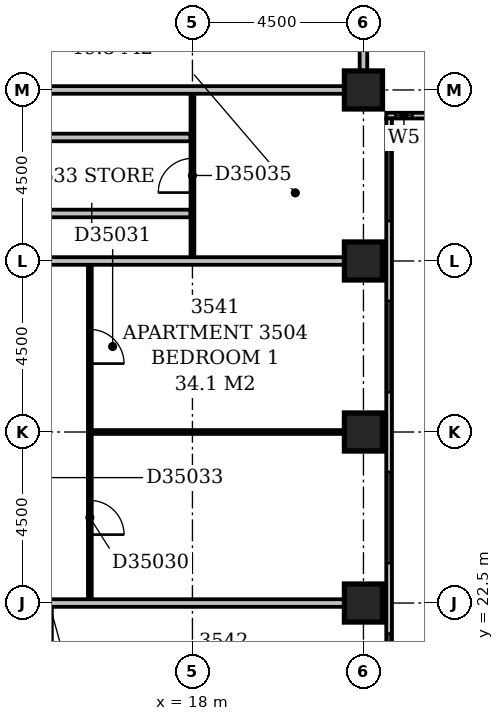
"""IFC4 building model, lengths in metres.
Left out: names, types, materials, properties, quantities, classifications, styles, units other than length and angle.
Written with IfcOpenShell. Run it as: python <this file> out.ifc"""

import sys

from ifc_helpers import new_model, si_unit, direction, frame, frame_2d, origin, origin_2d, place, context, subcontext, project, spatial, rectangle, extrude, element, fill, save


model = new_model("IFC4")
c1 = context("Model", 3, precision=1e-05, world=origin(), true_north=direction((0.0, 1.0)))
c2 = subcontext(c1, "Body", "Model", "MODEL_VIEW")
j1 = project(units=[si_unit("LENGTHUNIT", "METRE"), si_unit("PLANEANGLEUNIT", "RADIAN")], contexts=[c1])
p1 = place(None, origin())
s1 = spatial("IfcSite", under=j1, at=p1, CompositionType="ELEMENT")
p2 = place(p1, origin())
s2 = spatial("IfcBuilding", under=s1, at=p2, CompositionType="ELEMENT")
p3 = place(p2, frame((0.0, 0.0, 141.2)))
s3 = spatial("IfcBuildingStorey", under=s2, at=p3, CompositionType="ELEMENT", Elevation=141.2)
for number, where, z_axis, x_axis in (
    (1, (22.5, 22.5, -0.3), (0.0, 0.0, 1.0), (1.0, 0.0, 0.0)),
    (2, (22.5, 27.0, -0.3), (0.0, 0.0, 1.0), (1.0, 0.0, 0.0)),
    (3, (22.5, 31.5, -0.3), (0.0, 0.0, 1.0), (1.0, 0.0, 0.0)),
    (4, (22.5, 36.0, -0.3), (0.0, 0.0, 1.0), (1.0, 0.0, 0.0)),
):
    element("IfcColumn", number, at=place(p3, frame(where, z_axis=z_axis, x_axis=x_axis)), inside=s3, PredefinedType="COLUMN", context=c2, shape_type="SweptSolid", body=[
        extrude(rectangle(XDim=1.0, YDim=1.0, at=origin_2d()), origin(), (0.0, 0.0, 1.0), 3.6),
    ])
p4 = place(p3, frame((23.175, 17.4, 0.0), z_axis=(0.0, 0.0, 1.0), x_axis=(0.0, 1.0, 0.0)))
e5 = element("IfcWall", 5, at=p4, inside=s3, PredefinedType="STANDARD", context=c2, shape_type="SweptSolid", body=[
    extrude(rectangle(XDim=17.85, YDim=0.15, at=frame_2d((8.925, 0.0))), origin(), (0.0, 0.0, 1.0), 2.7),
])
p5 = place(p4, frame((3.397, 0.0, 0.6)))
e6 = element("IfcOpeningElement", 6, at=p5, cuts=e5, PredefinedType="OPENING", context=c2, shape_type="SweptSolid", body=[
    extrude(rectangle(XDim=0.9, YDim=1.8, at=frame_2d((0.45, 0.9))), frame((0.0, 0.087, 0.0), z_axis=(0.0, -1.0, 0.0), x_axis=(1.0, 0.0, 0.0)), (0.0, 0.0, 1.0), 0.174),
])
p6 = place(p4, frame((6.15, 0.0, 0.6)))
e7 = element("IfcOpeningElement", 7, at=p6, cuts=e5, PredefinedType="OPENING", context=c2, shape_type="SweptSolid", body=[
    extrude(rectangle(XDim=2.4, YDim=1.8, at=frame_2d((1.2, 0.9))), frame((0.0, 0.087, 0.0), z_axis=(0.0, -1.0, 0.0), x_axis=(1.0, 0.0, 0.0)), (0.0, 0.0, 1.0), 0.174),
])
p7 = place(p4, frame((10.65, 0.0, 0.6)))
e8 = element("IfcOpeningElement", 8, at=p7, cuts=e5, PredefinedType="OPENING", context=c2, shape_type="SweptSolid", body=[
    extrude(rectangle(XDim=2.4, YDim=1.8, at=frame_2d((1.2, 0.9))), frame((0.0, 0.087, 0.0), z_axis=(0.0, -1.0, 0.0), x_axis=(1.0, 0.0, 0.0)), (0.0, 0.0, 1.0), 0.174),
])
p8 = place(p4, frame((15.15, 0.0, 0.6)))
e9 = element("IfcOpeningElement", 9, at=p8, cuts=e5, PredefinedType="OPENING", context=c2, shape_type="SweptSolid", body=[
    extrude(rectangle(XDim=2.4, YDim=1.8, at=frame_2d((1.2, 0.9))), frame((0.0, 0.087, 0.0), z_axis=(0.0, -1.0, 0.0), x_axis=(1.0, 0.0, 0.0)), (0.0, 0.0, 1.0), 0.174),
])
p9 = place(p3, frame((23.1, 35.325, 0.0), z_axis=(0.0, 0.0, 1.0), x_axis=(1.0, 0.0, 0.0)))
e10 = element("IfcWall", 10, at=p9, inside=s3, PredefinedType="STANDARD", context=c2, shape_type="SweptSolid", body=[
    extrude(rectangle(XDim=45.15, YDim=0.15, at=frame_2d((22.575, 0.0))), origin(), (0.0, 0.0, 1.0), 2.7),
])
p10 = place(p9, frame((0.24, 0.0, 0.6)))
e11 = element("IfcOpeningElement", 11, at=p10, cuts=e10, PredefinedType="OPENING", context=c2, shape_type="SweptSolid", body=[
    extrude(rectangle(XDim=0.45, YDim=1.8, at=frame_2d((0.225, 0.9))), frame((0.0, 0.087, 0.0), z_axis=(0.0, -1.0, 0.0), x_axis=(1.0, 0.0, 0.0)), (0.0, 0.0, 1.0), 0.174),
])
p11 = place(p9, frame((2.529, 0.0, 0.6)))
e12 = element("IfcOpeningElement", 12, at=p11, cuts=e10, PredefinedType="OPENING", context=c2, shape_type="SweptSolid", body=[
    extrude(rectangle(XDim=0.6, YDim=1.8, at=frame_2d((0.3, 0.9))), frame((0.0, 0.087, 0.0), z_axis=(0.0, -1.0, 0.0), x_axis=(1.0, 0.0, 0.0)), (0.0, 0.0, 1.0), 0.174),
])
p12 = place(p9, frame((4.95, 0.0, 0.6)))
e13 = element("IfcOpeningElement", 13, at=p12, cuts=e10, PredefinedType="OPENING", context=c2, shape_type="SweptSolid", body=[
    extrude(rectangle(XDim=2.4, YDim=1.8, at=frame_2d((1.2, 0.9))), frame((0.0, 0.087, 0.0), z_axis=(0.0, -1.0, 0.0), x_axis=(1.0, 0.0, 0.0)), (0.0, 0.0, 1.0), 0.174),
])
p13 = place(p9, frame((9.45, 0.0, 0.6)))
e14 = element("IfcOpeningElement", 14, at=p13, cuts=e10, PredefinedType="OPENING", context=c2, shape_type="SweptSolid", body=[
    extrude(rectangle(XDim=2.4, YDim=1.8, at=frame_2d((1.2, 0.9))), frame((0.0, 0.087, 0.0), z_axis=(0.0, -1.0, 0.0), x_axis=(1.0, 0.0, 0.0)), (0.0, 0.0, 1.0), 0.174),
])
p14 = place(p9, frame((13.95, 0.0, 0.6)))
e15 = element("IfcOpeningElement", 15, at=p14, cuts=e10, PredefinedType="OPENING", context=c2, shape_type="SweptSolid", body=[
    extrude(rectangle(XDim=2.4, YDim=1.8, at=frame_2d((1.2, 0.9))), frame((0.0, 0.087, 0.0), z_axis=(0.0, -1.0, 0.0), x_axis=(1.0, 0.0, 0.0)), (0.0, 0.0, 1.0), 0.174),
])
p15 = place(p9, frame((18.45, 0.0, 0.6)))
e16 = element("IfcOpeningElement", 16, at=p15, cuts=e10, PredefinedType="OPENING", context=c2, shape_type="SweptSolid", body=[
    extrude(rectangle(XDim=2.4, YDim=1.8, at=frame_2d((1.2, 0.9))), frame((0.0, 0.087, 0.0), z_axis=(0.0, -1.0, 0.0), x_axis=(1.0, 0.0, 0.0)), (0.0, 0.0, 1.0), 0.174),
])
p16 = place(p9, frame((22.653, 0.0, 0.6)))
e17 = element("IfcOpeningElement", 17, at=p16, cuts=e10, PredefinedType="OPENING", context=c2, shape_type="SweptSolid", body=[
    extrude(rectangle(XDim=1.5, YDim=1.8, at=frame_2d((0.75, 0.9))), frame((0.0, 0.087, 0.0), z_axis=(0.0, -1.0, 0.0), x_axis=(1.0, 0.0, 0.0)), (0.0, 0.0, 1.0), 0.174),
])
p17 = place(p9, frame((29.27, 0.0, 0.6)))
e18 = element("IfcOpeningElement", 18, at=p17, cuts=e10, PredefinedType="OPENING", context=c2, shape_type="SweptSolid", body=[
    extrude(rectangle(XDim=0.9, YDim=1.8, at=frame_2d((0.45, 0.9))), frame((0.0, 0.087, 0.0), z_axis=(0.0, -1.0, 0.0), x_axis=(1.0, 0.0, 0.0)), (0.0, 0.0, 1.0), 0.174),
])
p18 = place(p9, frame((31.95, 0.0, 0.6)))
e19 = element("IfcOpeningElement", 19, at=p18, cuts=e10, PredefinedType="OPENING", context=c2, shape_type="SweptSolid", body=[
    extrude(rectangle(XDim=2.4, YDim=1.8, at=frame_2d((1.2, 0.9))), frame((0.0, 0.087, 0.0), z_axis=(0.0, -1.0, 0.0), x_axis=(1.0, 0.0, 0.0)), (0.0, 0.0, 1.0), 0.174),
])
p19 = place(p9, frame((36.45, 0.0, 0.6)))
e20 = element("IfcOpeningElement", 20, at=p19, cuts=e10, PredefinedType="OPENING", context=c2, shape_type="SweptSolid", body=[
    extrude(rectangle(XDim=2.4, YDim=1.8, at=frame_2d((1.2, 0.9))), frame((0.0, 0.087, 0.0), z_axis=(0.0, -1.0, 0.0), x_axis=(1.0, 0.0, 0.0)), (0.0, 0.0, 1.0), 0.174),
])
p20 = place(p9, frame((40.95, 0.0, 0.6)))
e21 = element("IfcOpeningElement", 21, at=p20, cuts=e10, PredefinedType="OPENING", context=c2, shape_type="SweptSolid", body=[
    extrude(rectangle(XDim=2.4, YDim=1.8, at=frame_2d((1.2, 0.9))), frame((0.0, 0.087, 0.0), z_axis=(0.0, -1.0, 0.0), x_axis=(1.0, 0.0, 0.0)), (0.0, 0.0, 1.0), 0.174),
])
p21 = place(p3, frame((9.1, 22.5, 0.0), z_axis=(0.0, 0.0, 1.0), x_axis=(1.0, 0.0, 0.0)))
e22 = element("IfcWall", 22, at=p21, inside=s3, PredefinedType="PARTITIONING", context=c2, shape_type="SweptSolid", body=[
    extrude(rectangle(XDim=12.9, YDim=0.2, at=frame_2d((6.45, 0.0))), origin(), (0.0, 0.0, 1.0), 3.3),
])
p22 = place(p3, frame((15.3, 22.6, 0.0), z_axis=(0.0, 0.0, 1.0), x_axis=(0.0, 1.0, 0.0)))
e23 = element("IfcWall", 23, at=p22, inside=s3, PredefinedType="PARTITIONING", context=c2, shape_type="SweptSolid", body=[
    extrude(rectangle(XDim=8.8, YDim=0.1, at=frame_2d((4.4, 0.0))), origin(), (0.0, 0.0, 1.0), 3.3),
])
p23 = place(p22, frame((1.7, 0.0, 0.0)))
e24 = element("IfcOpeningElement", 24, at=p23, cuts=e23, PredefinedType="OPENING", context=c2, shape_type="SweptSolid", body=[
    extrude(rectangle(XDim=0.9, YDim=2.1, at=frame_2d((0.45, 1.05))), frame((0.0, 0.062, 0.0), z_axis=(0.0, -1.0, 0.0), x_axis=(1.0, 0.0, 0.0)), (0.0, 0.0, 1.0), 0.124),
])
p24 = place(p22, frame((6.2, 0.0, 0.0)))
e25 = element("IfcOpeningElement", 25, at=p24, cuts=e23, PredefinedType="OPENING", context=c2, shape_type="SweptSolid", body=[
    extrude(rectangle(XDim=0.9, YDim=2.1, at=frame_2d((0.45, 1.05))), frame((0.0, 0.062, 0.0), z_axis=(0.0, -1.0, 0.0), x_axis=(1.0, 0.0, 0.0)), (0.0, 0.0, 1.0), 0.124),
])
p25 = place(p3, frame((15.35, 27.0, 0.0), z_axis=(0.0, 0.0, 1.0), x_axis=(1.0, 0.0, 0.0)))
e26 = element("IfcWall", 26, at=p25, inside=s3, PredefinedType="PARTITIONING", context=c2, shape_type="SweptSolid", body=[
    extrude(rectangle(XDim=6.65, YDim=0.1, at=frame_2d((3.325, 0.0))), origin(), (0.0, 0.0, 1.0), 2.7),
])
p26 = place(p3, frame((9.1, 31.5, 0.0), z_axis=(0.0, 0.0, 1.0), x_axis=(1.0, 0.0, 0.0)))
e27 = element("IfcWall", 27, at=p26, inside=s3, PredefinedType="PARTITIONING", context=c2, shape_type="SweptSolid", body=[
    extrude(rectangle(XDim=12.9, YDim=0.2, at=frame_2d((6.45, 0.0))), origin(), (0.0, 0.0, 1.0), 3.3),
])
p27 = place(p3, frame((18.0, 31.6, 0.0), z_axis=(0.0, 0.0, 1.0), x_axis=(0.0, 1.0, 0.0)))
e28 = element("IfcWall", 28, at=p27, inside=s3, PredefinedType="PARTITIONING", context=c2, shape_type="SweptSolid", body=[
    extrude(rectangle(XDim=4.3, YDim=0.1, at=frame_2d((2.15, 0.0))), origin(), (0.0, 0.0, 1.0), 3.3),
])
p28 = place(p27, frame((1.7, 0.0, 0.0)))
e29 = element("IfcOpeningElement", 29, at=p28, cuts=e28, PredefinedType="OPENING", context=c2, shape_type="SweptSolid", body=[
    extrude(rectangle(XDim=0.9, YDim=2.1, at=frame_2d((0.45, 1.05))), frame((0.0, 0.062, 0.0), z_axis=(0.0, -1.0, 0.0), x_axis=(1.0, 0.0, 0.0)), (0.0, 0.0, 1.0), 0.124),
])
p29 = place(p3, frame((9.1, 32.75, 0.0), z_axis=(0.0, 0.0, 1.0), x_axis=(1.0, 0.0, 0.0)))
e30 = element("IfcWall", 30, at=p29, inside=s3, PredefinedType="PARTITIONING", context=c2, shape_type="SweptSolid", body=[
    extrude(rectangle(XDim=8.85, YDim=0.2, at=frame_2d((4.425, 0.0))), origin(), (0.0, 0.0, 1.0), 3.3),
])
p30 = place(p29, frame((2.5, 0.0, 0.0)))
e31 = element("IfcOpeningElement", 31, at=p30, cuts=e30, PredefinedType="OPENING", context=c2, shape_type="SweptSolid", body=[
    extrude(rectangle(XDim=0.8, YDim=2.1, at=frame_2d((0.4, 1.05))), frame((0.0, 0.112, 0.0), z_axis=(0.0, -1.0, 0.0), x_axis=(1.0, 0.0, 0.0)), (0.0, 0.0, 1.0), 0.224),
])
p31 = place(p3, frame((9.1, 34.75, 0.0), z_axis=(0.0, 0.0, 1.0), x_axis=(1.0, 0.0, 0.0)))
e32 = element("IfcWall", 32, at=p31, inside=s3, PredefinedType="PARTITIONING", context=c2, shape_type="SweptSolid", body=[
    extrude(rectangle(XDim=8.85, YDim=0.2, at=frame_2d((4.425, 0.0))), origin(), (0.0, 0.0, 1.0), 3.3),
])
p32 = place(p31, frame((2.5, 0.0, 0.0)))
e33 = element("IfcOpeningElement", 33, at=p32, cuts=e32, PredefinedType="OPENING", context=c2, shape_type="SweptSolid", body=[
    extrude(rectangle(XDim=0.8, YDim=2.1, at=frame_2d((0.4, 1.05))), frame((0.0, 0.112, 0.0), z_axis=(0.0, -1.0, 0.0), x_axis=(1.0, 0.0, 0.0)), (0.0, 0.0, 1.0), 0.224),
])
for number, where, z_axis, x_axis in (
    (34, (9.1, 36.0, 0.0), (0.0, 0.0, 1.0), (1.0, 0.0, 0.0)),
    (35, (22.5, 36.5, 0.0), (0.0, 0.0, 1.0), (0.0, 1.0, 0.0)),
):
    element("IfcWall", number, at=place(p3, frame(where, z_axis=z_axis, x_axis=x_axis)), inside=s3, PredefinedType="PARTITIONING", context=c2, shape_type="SweptSolid", body=[
        extrude(rectangle(XDim=12.9, YDim=0.2, at=frame_2d((6.45, 0.0))), origin(), (0.0, 0.0, 1.0), 3.3),
    ])
p33 = place(p5, origin())
e36 = element("IfcWindow", 36, at=p33, inside=s3, PartitioningType="SINGLE_PANEL", PredefinedType="WINDOW", context=c2, shape_type="SweptSolid", body=[
    extrude(rectangle(XDim=0.9, YDim=1.8, at=frame_2d((0.45, 0.9))), frame((0.0, 0.03, 0.0), z_axis=(0.0, -1.0, 0.0), x_axis=(1.0, 0.0, 0.0)), (0.0, 0.0, 1.0), 0.06),
])
fill(e6, e36)
p34 = place(p6, origin())
e37 = element("IfcWindow", 37, at=p34, inside=s3, PartitioningType="SINGLE_PANEL", PredefinedType="WINDOW", context=c2, shape_type="SweptSolid", body=[
    extrude(rectangle(XDim=2.4, YDim=1.8, at=frame_2d((1.2, 0.9))), frame((0.0, 0.03, 0.0), z_axis=(0.0, -1.0, 0.0), x_axis=(1.0, 0.0, 0.0)), (0.0, 0.0, 1.0), 0.06),
])
fill(e7, e37)
p35 = place(p7, origin())
e38 = element("IfcWindow", 38, at=p35, inside=s3, PartitioningType="SINGLE_PANEL", PredefinedType="WINDOW", context=c2, shape_type="SweptSolid", body=[
    extrude(rectangle(XDim=2.4, YDim=1.8, at=frame_2d((1.2, 0.9))), frame((0.0, 0.03, 0.0), z_axis=(0.0, -1.0, 0.0), x_axis=(1.0, 0.0, 0.0)), (0.0, 0.0, 1.0), 0.06),
])
fill(e8, e38)
p36 = place(p8, origin())
e39 = element("IfcWindow", 39, at=p36, inside=s3, PartitioningType="SINGLE_PANEL", PredefinedType="WINDOW", context=c2, shape_type="SweptSolid", body=[
    extrude(rectangle(XDim=2.4, YDim=1.8, at=frame_2d((1.2, 0.9))), frame((0.0, 0.03, 0.0), z_axis=(0.0, -1.0, 0.0), x_axis=(1.0, 0.0, 0.0)), (0.0, 0.0, 1.0), 0.06),
])
fill(e9, e39)
p37 = place(p10, origin())
e40 = element("IfcWindow", 40, at=p37, inside=s3, PartitioningType="SINGLE_PANEL", PredefinedType="WINDOW", context=c2, shape_type="SweptSolid", body=[
    extrude(rectangle(XDim=0.45, YDim=1.8, at=frame_2d((0.225, 0.9))), frame((0.0, 0.03, 0.0), z_axis=(0.0, -1.0, 0.0), x_axis=(1.0, 0.0, 0.0)), (0.0, 0.0, 1.0), 0.06),
])
fill(e11, e40)
p38 = place(p23, frame((0.9, 0.0, 0.0), z_axis=(0.0, 0.0, 1.0), x_axis=(-1.0, 0.0, 0.0)))
e41 = element("IfcDoor", 41, at=p38, inside=s3, OperationType="SINGLE_SWING_RIGHT", PredefinedType="DOOR", context=c2, shape_type="SweptSolid", body=[
    extrude(rectangle(XDim=0.9, YDim=2.1, at=frame_2d((0.45, 1.05))), frame((0.0, 0.025, 0.0), z_axis=(0.0, -1.0, 0.0), x_axis=(1.0, 0.0, 0.0)), (0.0, 0.0, 1.0), 0.05),
])
fill(e24, e41)
p39 = place(p24, frame((0.9, 0.0, 0.0), z_axis=(0.0, 0.0, 1.0), x_axis=(-1.0, 0.0, 0.0)))
e42 = element("IfcDoor", 42, at=p39, inside=s3, OperationType="SINGLE_SWING_RIGHT", PredefinedType="DOOR", context=c2, shape_type="SweptSolid", body=[
    extrude(rectangle(XDim=0.9, YDim=2.1, at=frame_2d((0.45, 1.05))), frame((0.0, 0.025, 0.0), z_axis=(0.0, -1.0, 0.0), x_axis=(1.0, 0.0, 0.0)), (0.0, 0.0, 1.0), 0.05),
])
fill(e25, e42)
p40 = place(p28, origin())
e43 = element("IfcDoor", 43, at=p40, inside=s3, OperationType="SINGLE_SWING_LEFT", PredefinedType="DOOR", context=c2, shape_type="SweptSolid", body=[
    extrude(rectangle(XDim=0.9, YDim=2.1, at=frame_2d((0.45, 1.05))), frame((0.0, 0.025, 0.0), z_axis=(0.0, -1.0, 0.0), x_axis=(1.0, 0.0, 0.0)), (0.0, 0.0, 1.0), 0.05),
])
fill(e29, e43)
save(model, sys.argv[1])
